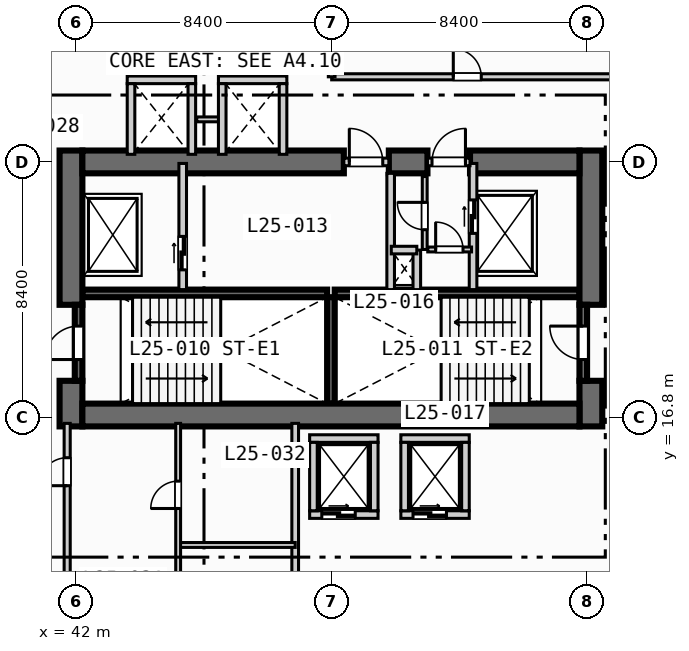
"""IFC4 building model, lengths in metres.
Left out: names, types, materials, properties, quantities, classifications, styles, units other than length and angle.
Written with IfcOpenShell. Run it as: python <this file> out.ifc"""

import sys

from ifc_helpers import new_model, si_unit, direction, frame, frame_2d, origin, place, context, subcontext, project, spatial, rectangle, extrude, element, fill, save


model = new_model("IFC4")
c1 = context("Model", 3, precision=1e-05, world=origin(), true_north=direction((0.0, 1.0)))
c2 = subcontext(c1, "Body", "Model", "MODEL_VIEW")
j1 = project(units=[si_unit("LENGTHUNIT", "METRE"), si_unit("PLANEANGLEUNIT", "RADIAN")], contexts=[c1])
p1 = place(None, origin())
s1 = spatial("IfcSite", under=j1, at=p1, CompositionType="ELEMENT")
p2 = place(p1, origin())
s2 = spatial("IfcBuilding", under=s1, at=p2, CompositionType="ELEMENT")
p3 = place(p2, frame((0.0, 0.0, 107.6)))
s3 = spatial("IfcBuildingStorey", under=s2, at=p3, CompositionType="ELEMENT", Elevation=107.6)
for number, where, z_axis, x_axis in (
    (1, (42.2, 20.875, 0.0), (0.0, 0.0, 1.0), (1.0, 0.0, 0.0)),
    (2, (50.5, 20.875, 0.0), (0.0, 0.0, 1.0), (1.0, 0.0, 0.0)),
):
    element("IfcWall", number, at=place(p3, frame(where, z_axis=z_axis, x_axis=x_axis)), inside=s3, PredefinedType="SOLIDWALL", context=c2, shape_type="SweptSolid", body=[
        extrude(rectangle(XDim=8.05, YDim=0.25, at=frame_2d((4.025, 0.0))), origin(), (0.0, 0.0, 1.0), 3.55),
    ])
p4 = place(p3, frame((50.375, 17.25, 0.0), z_axis=(0.0, 0.0, 1.0), x_axis=(0.0, 1.0, 0.0)))
e3 = element("IfcWall", 3, at=p4, inside=s3, PredefinedType="SOLIDWALL", context=c2, shape_type="SweptSolid", body=[
    extrude(rectangle(XDim=3.5, YDim=0.25, at=frame_2d((1.75, 0.0))), origin(), (0.0, 0.0, 1.0), 3.55),
])
p5 = place(p3, frame((41.825, 16.5, 0.0), z_axis=(0.0, 0.0, 1.0), x_axis=(0.0, 1.0, 0.0)))
e4 = element("IfcWall", 4, at=p5, inside=s3, PredefinedType="SHEAR", context=c2, shape_type="SweptSolid", body=[
    extrude(rectangle(XDim=1.5, YDim=0.75, at=frame_2d((0.75, 0.0))), origin(), (0.0, 0.0, 1.0), 3.55),
])
p6 = place(p3, frame((41.825, 20.5, 0.0), z_axis=(0.0, 0.0, 1.0), x_axis=(0.0, 1.0, 0.0)))
e5 = element("IfcWall", 5, at=p6, inside=s3, PredefinedType="SHEAR", context=c2, shape_type="SweptSolid", body=[
    extrude(rectangle(XDim=5.075, YDim=0.75, at=frame_2d((2.538, 0.0))), origin(), (0.0, 0.0, 1.0), 3.55),
])
p7 = place(p3, frame((58.925, 16.5, 0.0), z_axis=(0.0, 0.0, 1.0), x_axis=(0.0, 1.0, 0.0)))
e6 = element("IfcWall", 6, at=p7, inside=s3, PredefinedType="SHEAR", context=c2, shape_type="SweptSolid", body=[
    extrude(rectangle(XDim=1.5, YDim=0.75, at=frame_2d((0.75, 0.0))), origin(), (0.0, 0.0, 1.0), 3.55),
])
p8 = place(p3, frame((58.925, 20.5, 0.0), z_axis=(0.0, 0.0, 1.0), x_axis=(0.0, 1.0, 0.0)))
e7 = element("IfcWall", 7, at=p8, inside=s3, PredefinedType="SHEAR", context=c2, shape_type="SweptSolid", body=[
    extrude(rectangle(XDim=5.075, YDim=0.75, at=frame_2d((2.538, 0.0))), origin(), (0.0, 0.0, 1.0), 3.55),
])
p9 = place(p3, frame((42.2, 16.875, 0.0), z_axis=(0.0, 0.0, 1.0), x_axis=(1.0, 0.0, 0.0)))
e8 = element("IfcWall", 8, at=p9, inside=s3, PredefinedType="SHEAR", context=c2, shape_type="SweptSolid", body=[
    extrude(rectangle(XDim=16.35, YDim=0.75, at=frame_2d((8.175, 0.0))), origin(), (0.0, 0.0, 1.0), 3.55),
])
p10 = place(p3, frame((42.2, 25.2, 0.0), z_axis=(0.0, 0.0, 1.0), x_axis=(1.0, 0.0, 0.0)))
e9 = element("IfcWall", 9, at=p10, inside=s3, PredefinedType="SHEAR", context=c2, shape_type="SweptSolid", body=[
    extrude(rectangle(XDim=8.6, YDim=0.75, at=frame_2d((4.3, 0.0))), origin(), (0.0, 0.0, 1.0), 3.55),
])
p11 = place(p3, frame((52.28, 25.2, 0.0), z_axis=(0.0, 0.0, 1.0), x_axis=(1.0, 0.0, 0.0)))
e10 = element("IfcWall", 10, at=p11, inside=s3, PredefinedType="SHEAR", context=c2, shape_type="SweptSolid", body=[
    extrude(rectangle(XDim=1.27, YDim=0.75, at=frame_2d((0.635, 0.0))), origin(), (0.0, 0.0, 1.0), 3.55),
])
p12 = place(p3, frame((54.95, 25.2, 0.0), z_axis=(0.0, 0.0, 1.0), x_axis=(1.0, 0.0, 0.0)))
e11 = element("IfcWall", 11, at=p12, inside=s3, PredefinedType="SHEAR", context=c2, shape_type="SweptSolid", body=[
    extrude(rectangle(XDim=3.6, YDim=0.75, at=frame_2d((1.8, 0.0))), origin(), (0.0, 0.0, 1.0), 3.55),
])
p13 = place(p3, frame((42.075, 18.0, 0.0), z_axis=(0.0, 0.0, 1.0), x_axis=(0.0, 1.0, 0.0)))
e12 = element("IfcWall", 12, at=p13, inside=s3, PredefinedType="SOLIDWALL", context=c2, shape_type="SweptSolid", body=[
    extrude(rectangle(XDim=2.5, YDim=0.25, at=frame_2d((1.25, 0.0))), origin(), (0.0, 0.0, 1.0), 3.55),
])
p14 = place(p13, frame((0.7, 0.0, 0.0)))
e13 = element("IfcOpeningElement", 13, at=p14, cuts=e12, PredefinedType="OPENING", context=c2, shape_type="SweptSolid", body=[
    extrude(rectangle(XDim=1.1, YDim=2.15, at=frame_2d((0.55, 1.075))), frame((0.0, 0.135, 0.0), z_axis=(0.0, -1.0, 0.0), x_axis=(1.0, 0.0, 0.0)), (0.0, 0.0, 1.0), 0.27),
])
p15 = place(p3, frame((58.675, 18.0, 0.0), z_axis=(0.0, 0.0, 1.0), x_axis=(0.0, 1.0, 0.0)))
e14 = element("IfcWall", 14, at=p15, inside=s3, PredefinedType="SOLIDWALL", context=c2, shape_type="SweptSolid", body=[
    extrude(rectangle(XDim=2.5, YDim=0.25, at=frame_2d((1.25, 0.0))), origin(), (0.0, 0.0, 1.0), 3.55),
])
p16 = place(p15, frame((0.7, 0.0, 0.0)))
e15 = element("IfcOpeningElement", 15, at=p16, cuts=e14, PredefinedType="OPENING", context=c2, shape_type="SweptSolid", body=[
    extrude(rectangle(XDim=1.1, YDim=2.15, at=frame_2d((0.55, 1.075))), frame((0.0, 0.135, 0.0), z_axis=(0.0, -1.0, 0.0), x_axis=(1.0, 0.0, 0.0)), (0.0, 0.0, 1.0), 0.27),
])
p17 = place(p3, frame((45.5, 21.0, 0.0), z_axis=(0.0, 0.0, 1.0), x_axis=(0.0, 1.0, 0.0)))
e16 = element("IfcWall", 16, at=p17, inside=s3, PredefinedType="SOLIDWALL", context=c2, shape_type="SweptSolid", body=[
    extrude(rectangle(XDim=4.15, YDim=0.25, at=frame_2d((2.075, 0.0))), origin(), (0.0, 0.0, 1.0), 3.55),
])
p18 = place(p17, frame((0.65, 0.0, 0.0)))
e17 = element("IfcOpeningElement", 17, at=p18, cuts=e16, PredefinedType="OPENING", context=c2, shape_type="SweptSolid", body=[
    extrude(rectangle(XDim=1.1, YDim=2.15, at=frame_2d((0.55, 1.075))), frame((0.0, 0.135, 0.0), z_axis=(0.0, -1.0, 0.0), x_axis=(1.0, 0.0, 0.0)), (0.0, 0.0, 1.0), 0.27),
])
p19 = place(p3, frame((50.8, 25.2, 0.0), z_axis=(0.0, 0.0, 1.0), x_axis=(1.0, 0.0, 0.0)))
e18 = element("IfcWall", 18, at=p19, inside=s3, PredefinedType="SOLIDWALL", context=c2, shape_type="SweptSolid", body=[
    extrude(rectangle(XDim=1.48, YDim=0.25, at=frame_2d((0.74, 0.0))), origin(), (0.0, 0.0, 1.0), 3.55),
])
p20 = place(p19, frame((0.18, 0.0, 0.0)))
e19 = element("IfcOpeningElement", 19, at=p20, cuts=e18, PredefinedType="OPENING", context=c2, shape_type="SweptSolid", body=[
    extrude(rectangle(XDim=1.1, YDim=2.15, at=frame_2d((0.55, 1.075))), frame((0.0, 0.135, 0.0), z_axis=(0.0, -1.0, 0.0), x_axis=(1.0, 0.0, 0.0)), (0.0, 0.0, 1.0), 0.27),
])
p21 = place(p3, frame((52.34, 21.0, 0.0), z_axis=(0.0, 0.0, 1.0), x_axis=(0.0, 1.0, 0.0)))
e20 = element("IfcWall", 20, at=p21, inside=s3, PredefinedType="SOLIDWALL", context=c2, shape_type="SweptSolid", body=[
    extrude(rectangle(XDim=3.825, YDim=0.25, at=frame_2d((1.913, 0.0))), origin(), (0.0, 0.0, 1.0), 3.55),
])
p22 = place(p3, frame((55.05, 21.0, 0.0), z_axis=(0.0, 0.0, 1.0), x_axis=(0.0, 1.0, 0.0)))
e21 = element("IfcWall", 21, at=p22, inside=s3, PredefinedType="SOLIDWALL", context=c2, shape_type="SweptSolid", body=[
    extrude(rectangle(XDim=4.15, YDim=0.25, at=frame_2d((2.075, 0.0))), origin(), (0.0, 0.0, 1.0), 3.55),
])
p23 = place(p22, frame((1.85, 0.0, 0.0)))
e22 = element("IfcOpeningElement", 22, at=p23, cuts=e21, PredefinedType="OPENING", context=c2, shape_type="SweptSolid", body=[
    extrude(rectangle(XDim=1.1, YDim=2.15, at=frame_2d((0.55, 1.075))), frame((0.0, 0.135, 0.0), z_axis=(0.0, -1.0, 0.0), x_axis=(1.0, 0.0, 0.0)), (0.0, 0.0, 1.0), 0.27),
])
p24 = place(p3, frame((53.55, 25.2, 0.0), z_axis=(0.0, 0.0, 1.0), x_axis=(1.0, 0.0, 0.0)))
e23 = element("IfcWall", 23, at=p24, inside=s3, PredefinedType="SOLIDWALL", context=c2, shape_type="SweptSolid", body=[
    extrude(rectangle(XDim=1.4, YDim=0.25, at=frame_2d((0.7, 0.0))), origin(), (0.0, 0.0, 1.0), 3.55),
])
p25 = place(p24, frame((0.15, 0.0, 0.0)))
e24 = element("IfcOpeningElement", 24, at=p25, cuts=e23, PredefinedType="OPENING", context=c2, shape_type="SweptSolid", body=[
    extrude(rectangle(XDim=1.1, YDim=2.15, at=frame_2d((0.55, 1.075))), frame((0.0, 0.135, 0.0), z_axis=(0.0, -1.0, 0.0), x_axis=(1.0, 0.0, 0.0)), (0.0, 0.0, 1.0), 0.27),
])
p26 = place(p3, frame((53.2, 21.0, 0.0), z_axis=(0.0, 0.0, 1.0), x_axis=(0.0, 1.0, 0.0)))
e25 = element("IfcWall", 25, at=p26, inside=s3, PredefinedType="SOLIDWALL", context=c2, shape_type="SweptSolid", body=[
    extrude(rectangle(XDim=1.3, YDim=0.25, at=frame_2d((0.65, 0.0))), origin(), (0.0, 0.0, 1.0), 3.55),
])
p27 = place(p3, frame((52.36, 22.3, 0.0), z_axis=(0.0, 0.0, 1.0), x_axis=(1.0, 0.0, 0.0)))
e26 = element("IfcWall", 26, at=p27, inside=s3, PredefinedType="SOLIDWALL", context=c2, shape_type="SweptSolid", body=[
    extrude(rectangle(XDim=0.84, YDim=0.25, at=frame_2d((0.42, 0.0))), origin(), (0.0, 0.0, 1.0), 3.55),
])
p28 = place(p3, frame((53.56, 22.32, 0.0), z_axis=(0.0, 0.0, 1.0), x_axis=(1.0, 0.0, 0.0)))
e27 = element("IfcWall", 27, at=p28, inside=s3, PredefinedType="PARTITIONING", context=c2, shape_type="SweptSolid", body=[
    extrude(rectangle(XDim=1.44, YDim=0.16, at=frame_2d((0.72, 0.0))), origin(), (0.0, 0.0, 1.0), 3.55),
])
p29 = place(p28, frame((0.26, 0.0, 0.0)))
e28 = element("IfcOpeningElement", 28, at=p29, cuts=e27, PredefinedType="OPENING", context=c2, shape_type="SweptSolid", body=[
    extrude(rectangle(XDim=0.9, YDim=2.1, at=frame_2d((0.45, 1.05))), frame((0.0, 0.09, 0.0), z_axis=(0.0, -1.0, 0.0), x_axis=(1.0, 0.0, 0.0)), (0.0, 0.0, 1.0), 0.18),
])
p30 = place(p3, frame((53.46, 22.32, 0.0), z_axis=(0.0, 0.0, 1.0), x_axis=(0.0, 1.0, 0.0)))
e29 = element("IfcWall", 29, at=p30, inside=s3, PredefinedType="PARTITIONING", context=c2, shape_type="SweptSolid", body=[
    extrude(rectangle(XDim=2.4, YDim=0.16, at=frame_2d((1.2, 0.0))), origin(), (0.0, 0.0, 1.0), 3.55),
])
p31 = place(p30, frame((0.65, 0.0, 0.0)))
e30 = element("IfcOpeningElement", 30, at=p31, cuts=e29, PredefinedType="OPENING", context=c2, shape_type="SweptSolid", body=[
    extrude(rectangle(XDim=0.9, YDim=2.1, at=frame_2d((0.45, 1.05))), frame((0.0, 0.09, 0.0), z_axis=(0.0, -1.0, 0.0), x_axis=(1.0, 0.0, 0.0)), (0.0, 0.0, 1.0), 0.18),
])
p32 = place(p3, frame((49.675, 13.6, 0.0), z_axis=(0.0, 0.0, 1.0), x_axis=(1.0, 0.0, 0.0)))
e31 = element("IfcWall", 31, at=p32, inside=s3, PredefinedType="SOLIDWALL", context=c2, shape_type="SweptSolid", body=[
    extrude(rectangle(XDim=2.25, YDim=0.25, at=frame_2d((1.125, 0.0))), origin(), (0.0, 0.0, 1.0), 3.55),
])
p33 = place(p32, frame((0.4, 0.0, 0.0)))
e32 = element("IfcOpeningElement", 32, at=p33, cuts=e31, PredefinedType="OPENING", context=c2, shape_type="SweptSolid", body=[
    extrude(rectangle(XDim=1.1, YDim=2.15, at=frame_2d((0.55, 1.075))), frame((0.0, 0.135, 0.0), z_axis=(0.0, -1.0, 0.0), x_axis=(1.0, 0.0, 0.0)), (0.0, 0.0, 1.0), 0.27),
])
for number, where, z_axis, x_axis in (
    (33, (49.675, 16.1, 0.0), (0.0, 0.0, 1.0), (1.0, 0.0, 0.0)),
    (34, (49.8, 13.725, 0.0), (0.0, 0.0, 1.0), (0.0, 1.0, 0.0)),
    (35, (51.8, 13.725, 0.0), (0.0, 0.0, 1.0), (0.0, 1.0, 0.0)),
):
    element("IfcWall", number, at=place(p3, frame(where, z_axis=z_axis, x_axis=x_axis)), inside=s3, PredefinedType="SOLIDWALL", context=c2, shape_type="SweptSolid", body=[
        extrude(rectangle(XDim=2.25, YDim=0.25, at=frame_2d((1.125, 0.0))), origin(), (0.0, 0.0, 1.0), 3.55),
    ])
p34 = place(p3, frame((52.675, 13.6, 0.0), z_axis=(0.0, 0.0, 1.0), x_axis=(1.0, 0.0, 0.0)))
e36 = element("IfcWall", 36, at=p34, inside=s3, PredefinedType="SOLIDWALL", context=c2, shape_type="SweptSolid", body=[
    extrude(rectangle(XDim=2.25, YDim=0.25, at=frame_2d((1.125, 0.0))), origin(), (0.0, 0.0, 1.0), 3.55),
])
p35 = place(p34, frame((0.4, 0.0, 0.0)))
e37 = element("IfcOpeningElement", 37, at=p35, cuts=e36, PredefinedType="OPENING", context=c2, shape_type="SweptSolid", body=[
    extrude(rectangle(XDim=1.1, YDim=2.15, at=frame_2d((0.55, 1.075))), frame((0.0, 0.135, 0.0), z_axis=(0.0, -1.0, 0.0), x_axis=(1.0, 0.0, 0.0)), (0.0, 0.0, 1.0), 0.27),
])
for number, where, z_axis, x_axis in (
    (38, (52.675, 16.1, 0.0), (0.0, 0.0, 1.0), (1.0, 0.0, 0.0)),
    (39, (52.8, 13.725, 0.0), (0.0, 0.0, 1.0), (0.0, 1.0, 0.0)),
    (40, (54.8, 13.725, 0.0), (0.0, 0.0, 1.0), (0.0, 1.0, 0.0)),
    (41, (43.675, 27.9, 0.0), (0.0, 0.0, 1.0), (1.0, 0.0, 0.0)),
):
    element("IfcWall", number, at=place(p3, frame(where, z_axis=z_axis, x_axis=x_axis)), inside=s3, PredefinedType="SOLIDWALL", context=c2, shape_type="SweptSolid", body=[
        extrude(rectangle(XDim=2.25, YDim=0.25, at=frame_2d((1.125, 0.0))), origin(), (0.0, 0.0, 1.0), 3.55),
    ])
for number, where, z_axis, x_axis in (
    (42, (43.8, 25.45, 0.0), (0.0, 0.0, 1.0), (0.0, 1.0, 0.0)),
    (43, (45.8, 25.45, 0.0), (0.0, 0.0, 1.0), (0.0, 1.0, 0.0)),
):
    element("IfcWall", number, at=place(p3, frame(where, z_axis=z_axis, x_axis=x_axis)), inside=s3, PredefinedType="SOLIDWALL", context=c2, shape_type="SweptSolid", body=[
        extrude(rectangle(XDim=2.325, YDim=0.25, at=frame_2d((1.163, 0.0))), origin(), (0.0, 0.0, 1.0), 3.55),
    ])
p36 = place(p3, frame((45.96, 26.6, 0.0), z_axis=(0.0, 0.0, 1.0), x_axis=(1.0, 0.0, 0.0)))
e44 = element("IfcWall", 44, at=p36, inside=s3, PredefinedType="PARTITIONING", context=c2, shape_type="SweptSolid", body=[
    extrude(rectangle(XDim=0.88, YDim=0.16, at=frame_2d((0.44, 0.0))), origin(), (0.0, 0.0, 1.0), 3.55),
])
p37 = place(p3, frame((46.675, 27.9, 0.0), z_axis=(0.0, 0.0, 1.0), x_axis=(1.0, 0.0, 0.0)))
e45 = element("IfcWall", 45, at=p37, inside=s3, PredefinedType="SOLIDWALL", context=c2, shape_type="SweptSolid", body=[
    extrude(rectangle(XDim=2.25, YDim=0.25, at=frame_2d((1.125, 0.0))), origin(), (0.0, 0.0, 1.0), 3.55),
])
for number, where, z_axis, x_axis in (
    (46, (46.8, 25.45, 0.0), (0.0, 0.0, 1.0), (0.0, 1.0, 0.0)),
    (47, (48.8, 25.45, 0.0), (0.0, 0.0, 1.0), (0.0, 1.0, 0.0)),
):
    element("IfcWall", number, at=place(p3, frame(where, z_axis=z_axis, x_axis=x_axis)), inside=s3, PredefinedType="SOLIDWALL", context=c2, shape_type="SweptSolid", body=[
        extrude(rectangle(XDim=2.325, YDim=0.25, at=frame_2d((1.163, 0.0))), origin(), (0.0, 0.0, 1.0), 3.55),
    ])
p38 = place(p3, frame((41.7, 0.35, 0.0), z_axis=(0.0, 0.0, 1.0), x_axis=(0.0, 1.0, 0.0)))
e48 = element("IfcWall", 48, at=p38, inside=s3, PredefinedType="PARTITIONING", context=c2, shape_type="SweptSolid", body=[
    extrude(rectangle(XDim=16.25, YDim=0.2, at=frame_2d((8.125, 0.0))), origin(), (0.0, 0.0, 1.0), 2.8),
])
p39 = place(p38, frame((4.0, 0.0, 0.0)))
e49 = element("IfcOpeningElement", 49, at=p39, cuts=e48, PredefinedType="OPENING", context=c2, shape_type="SweptSolid", body=[
    extrude(rectangle(XDim=0.92, YDim=2.1, at=frame_2d((0.46, 1.05))), frame((0.0, 0.11, 0.0), z_axis=(0.0, -1.0, 0.0), x_axis=(1.0, 0.0, 0.0)), (0.0, 0.0, 1.0), 0.22),
])
p40 = place(p38, frame((14.2, 0.0, 0.0)))
e50 = element("IfcOpeningElement", 50, at=p40, cuts=e48, PredefinedType="OPENING", context=c2, shape_type="SweptSolid", body=[
    extrude(rectangle(XDim=0.92, YDim=2.1, at=frame_2d((0.46, 1.05))), frame((0.0, 0.11, 0.0), z_axis=(0.0, -1.0, 0.0), x_axis=(1.0, 0.0, 0.0)), (0.0, 0.0, 1.0), 0.22),
])
p41 = place(p3, frame((49.2, 0.35, 0.0), z_axis=(0.0, 0.0, 1.0), x_axis=(0.0, 1.0, 0.0)))
e51 = element("IfcWall", 51, at=p41, inside=s3, PredefinedType="PARTITIONING", context=c2, shape_type="SweptSolid", body=[
    extrude(rectangle(XDim=16.25, YDim=0.22, at=frame_2d((8.125, 0.0))), origin(), (0.0, 0.0, 1.0), 3.55),
])
p42 = place(p3, frame((45.35, 12.6, 0.0), z_axis=(0.0, 0.0, 1.0), x_axis=(1.0, 0.0, 0.0)))
e52 = element("IfcWall", 52, at=p42, inside=s3, PredefinedType="PARTITIONING", context=c2, shape_type="SweptSolid", body=[
    extrude(rectangle(XDim=3.85, YDim=0.16, at=frame_2d((1.925, 0.0))), origin(), (0.0, 0.0, 1.0), 3.55),
])
p43 = place(p3, frame((45.35, 9.4, 0.0), z_axis=(0.0, 0.0, 1.0), x_axis=(0.0, 1.0, 0.0)))
e53 = element("IfcWall", 53, at=p43, inside=s3, PredefinedType="PARTITIONING", context=c2, shape_type="SweptSolid", body=[
    extrude(rectangle(XDim=7.2, YDim=0.16, at=frame_2d((3.6, 0.0))), origin(), (0.0, 0.0, 1.0), 3.55),
])
p44 = place(p43, frame((4.4, 0.0, 0.0)))
e54 = element("IfcOpeningElement", 54, at=p44, cuts=e53, PredefinedType="OPENING", context=c2, shape_type="SweptSolid", body=[
    extrude(rectangle(XDim=0.9, YDim=2.1, at=frame_2d((0.45, 1.05))), frame((0.0, 0.09, 0.0), z_axis=(0.0, -1.0, 0.0), x_axis=(1.0, 0.0, 0.0)), (0.0, 0.0, 1.0), 0.18),
])
p45 = place(p3, frame((50.4, 28.0, 0.0), z_axis=(0.0, 0.0, 1.0), x_axis=(1.0, 0.0, 0.0)))
e55 = element("IfcWall", 55, at=p45, inside=s3, PredefinedType="PARTITIONING", context=c2, shape_type="SweptSolid", body=[
    extrude(rectangle(XDim=21.8, YDim=0.2, at=frame_2d((10.9, 0.0))), origin(), (0.0, 0.0, 1.0), 3.55),
])
p46 = place(p45, frame((4.0, 0.0, 0.0)))
e56 = element("IfcOpeningElement", 56, at=p46, cuts=e55, PredefinedType="OPENING", context=c2, shape_type="SweptSolid", body=[
    extrude(rectangle(XDim=0.92, YDim=2.1, at=frame_2d((0.46, 1.05))), frame((0.0, 0.11, 0.0), z_axis=(0.0, -1.0, 0.0), x_axis=(1.0, 0.0, 0.0)), (0.0, 0.0, 1.0), 0.22),
])
p47 = place(p3, frame((50.4, 28.0, 0.0), z_axis=(0.0, 0.0, 1.0), x_axis=(0.0, 1.0, 0.0)))
e57 = element("IfcWall", 57, at=p47, inside=s3, PredefinedType="PARTITIONING", context=c2, shape_type="SweptSolid", body=[
    extrude(rectangle(XDim=5.3, YDim=0.22, at=frame_2d((2.65, 0.0))), origin(), (0.0, 0.0, 1.0), 2.933),
])
p48 = place(p14, origin())
e58 = element("IfcDoor", 58, at=p48, inside=s3, OperationType="SINGLE_SWING_LEFT", PredefinedType="DOOR", context=c2, shape_type="SweptSolid", body=[
    extrude(rectangle(XDim=1.1, YDim=2.15, at=frame_2d((0.55, 1.075))), frame((0.0, 0.025, 0.0), z_axis=(0.0, -1.0, 0.0), x_axis=(1.0, 0.0, 0.0)), (0.0, 0.0, 1.0), 0.05),
])
fill(e13, e58)
p49 = place(p16, origin())
e59 = element("IfcDoor", 59, at=p49, inside=s3, OperationType="SINGLE_SWING_RIGHT", PredefinedType="DOOR", context=c2, shape_type="SweptSolid", body=[
    extrude(rectangle(XDim=1.1, YDim=2.15, at=frame_2d((0.55, 1.075))), frame((0.0, 0.025, 0.0), z_axis=(0.0, -1.0, 0.0), x_axis=(1.0, 0.0, 0.0)), (0.0, 0.0, 1.0), 0.05),
])
fill(e15, e59)
p50 = place(p18, origin())
e60 = element("IfcDoor", 60, at=p50, inside=s3, OperationType="SLIDING_TO_LEFT", PredefinedType="DOOR", context=c2, shape_type="SweptSolid", body=[
    extrude(rectangle(XDim=1.1, YDim=2.15, at=frame_2d((0.55, 1.075))), frame((0.0, 0.025, 0.0), z_axis=(0.0, -1.0, 0.0), x_axis=(1.0, 0.0, 0.0)), (0.0, 0.0, 1.0), 0.05),
])
fill(e17, e60)
p51 = place(p20, origin())
e61 = element("IfcDoor", 61, at=p51, inside=s3, OperationType="SINGLE_SWING_LEFT", PredefinedType="DOOR", context=c2, shape_type="SweptSolid", body=[
    extrude(rectangle(XDim=1.1, YDim=2.15, at=frame_2d((0.55, 1.075))), frame((0.0, 0.025, 0.0), z_axis=(0.0, -1.0, 0.0), x_axis=(1.0, 0.0, 0.0)), (0.0, 0.0, 1.0), 0.05),
])
fill(e19, e61)
p52 = place(p23, origin())
e62 = element("IfcDoor", 62, at=p52, inside=s3, OperationType="SLIDING_TO_LEFT", PredefinedType="DOOR", context=c2, shape_type="SweptSolid", body=[
    extrude(rectangle(XDim=1.1, YDim=2.15, at=frame_2d((0.55, 1.075))), frame((0.0, 0.025, 0.0), z_axis=(0.0, -1.0, 0.0), x_axis=(1.0, 0.0, 0.0)), (0.0, 0.0, 1.0), 0.05),
])
fill(e22, e62)
p53 = place(p25, origin())
e63 = element("IfcDoor", 63, at=p53, inside=s3, OperationType="SINGLE_SWING_RIGHT", PredefinedType="DOOR", context=c2, shape_type="SweptSolid", body=[
    extrude(rectangle(XDim=1.1, YDim=2.15, at=frame_2d((0.55, 1.075))), frame((0.0, 0.025, 0.0), z_axis=(0.0, -1.0, 0.0), x_axis=(1.0, 0.0, 0.0)), (0.0, 0.0, 1.0), 0.05),
])
fill(e24, e63)
p54 = place(p29, origin())
e64 = element("IfcDoor", 64, at=p54, inside=s3, OperationType="SINGLE_SWING_LEFT", PredefinedType="DOOR", context=c2, shape_type="SweptSolid", body=[
    extrude(rectangle(XDim=0.9, YDim=2.1, at=frame_2d((0.45, 1.05))), frame((0.0, 0.025, 0.0), z_axis=(0.0, -1.0, 0.0), x_axis=(1.0, 0.0, 0.0)), (0.0, 0.0, 1.0), 0.05),
])
fill(e28, e64)
p55 = place(p31, origin())
e65 = element("IfcDoor", 65, at=p55, inside=s3, OperationType="SINGLE_SWING_RIGHT", PredefinedType="DOOR", context=c2, shape_type="SweptSolid", body=[
    extrude(rectangle(XDim=0.9, YDim=2.1, at=frame_2d((0.45, 1.05))), frame((0.0, 0.025, 0.0), z_axis=(0.0, -1.0, 0.0), x_axis=(1.0, 0.0, 0.0)), (0.0, 0.0, 1.0), 0.05),
])
fill(e30, e65)
p56 = place(p33, origin())
e66 = element("IfcDoor", 66, at=p56, inside=s3, OperationType="SLIDING_TO_LEFT", PredefinedType="DOOR", context=c2, shape_type="SweptSolid", body=[
    extrude(rectangle(XDim=1.1, YDim=2.15, at=frame_2d((0.55, 1.075))), frame((0.0, 0.025, 0.0), z_axis=(0.0, -1.0, 0.0), x_axis=(1.0, 0.0, 0.0)), (0.0, 0.0, 1.0), 0.05),
])
fill(e32, e66)
p57 = place(p35, origin())
e67 = element("IfcDoor", 67, at=p57, inside=s3, OperationType="SLIDING_TO_LEFT", PredefinedType="DOOR", context=c2, shape_type="SweptSolid", body=[
    extrude(rectangle(XDim=1.1, YDim=2.15, at=frame_2d((0.55, 1.075))), frame((0.0, 0.025, 0.0), z_axis=(0.0, -1.0, 0.0), x_axis=(1.0, 0.0, 0.0)), (0.0, 0.0, 1.0), 0.05),
])
fill(e37, e67)
p58 = place(p40, origin())
e68 = element("IfcDoor", 68, at=p58, inside=s3, OperationType="SINGLE_SWING_LEFT", PredefinedType="DOOR", context=c2, shape_type="SweptSolid", body=[
    extrude(rectangle(XDim=0.92, YDim=2.1, at=frame_2d((0.46, 1.05))), frame((0.0, 0.025, 0.0), z_axis=(0.0, -1.0, 0.0), x_axis=(1.0, 0.0, 0.0)), (0.0, 0.0, 1.0), 0.05),
])
fill(e50, e68)
p59 = place(p44, origin())
e69 = element("IfcDoor", 69, at=p59, inside=s3, OperationType="SINGLE_SWING_LEFT", PredefinedType="DOOR", context=c2, shape_type="SweptSolid", body=[
    extrude(rectangle(XDim=0.9, YDim=2.1, at=frame_2d((0.45, 1.05))), frame((0.0, 0.025, 0.0), z_axis=(0.0, -1.0, 0.0), x_axis=(1.0, 0.0, 0.0)), (0.0, 0.0, 1.0), 0.05),
])
fill(e54, e69)
p60 = place(p46, origin())
e70 = element("IfcDoor", 70, at=p60, inside=s3, OperationType="SINGLE_SWING_LEFT", PredefinedType="DOOR", context=c2, shape_type="SweptSolid", body=[
    extrude(rectangle(XDim=0.92, YDim=2.1, at=frame_2d((0.46, 1.05))), frame((0.0, 0.025, 0.0), z_axis=(0.0, -1.0, 0.0), x_axis=(1.0, 0.0, 0.0)), (0.0, 0.0, 1.0), 0.05),
])
fill(e56, e70)
save(model, sys.argv[1])
